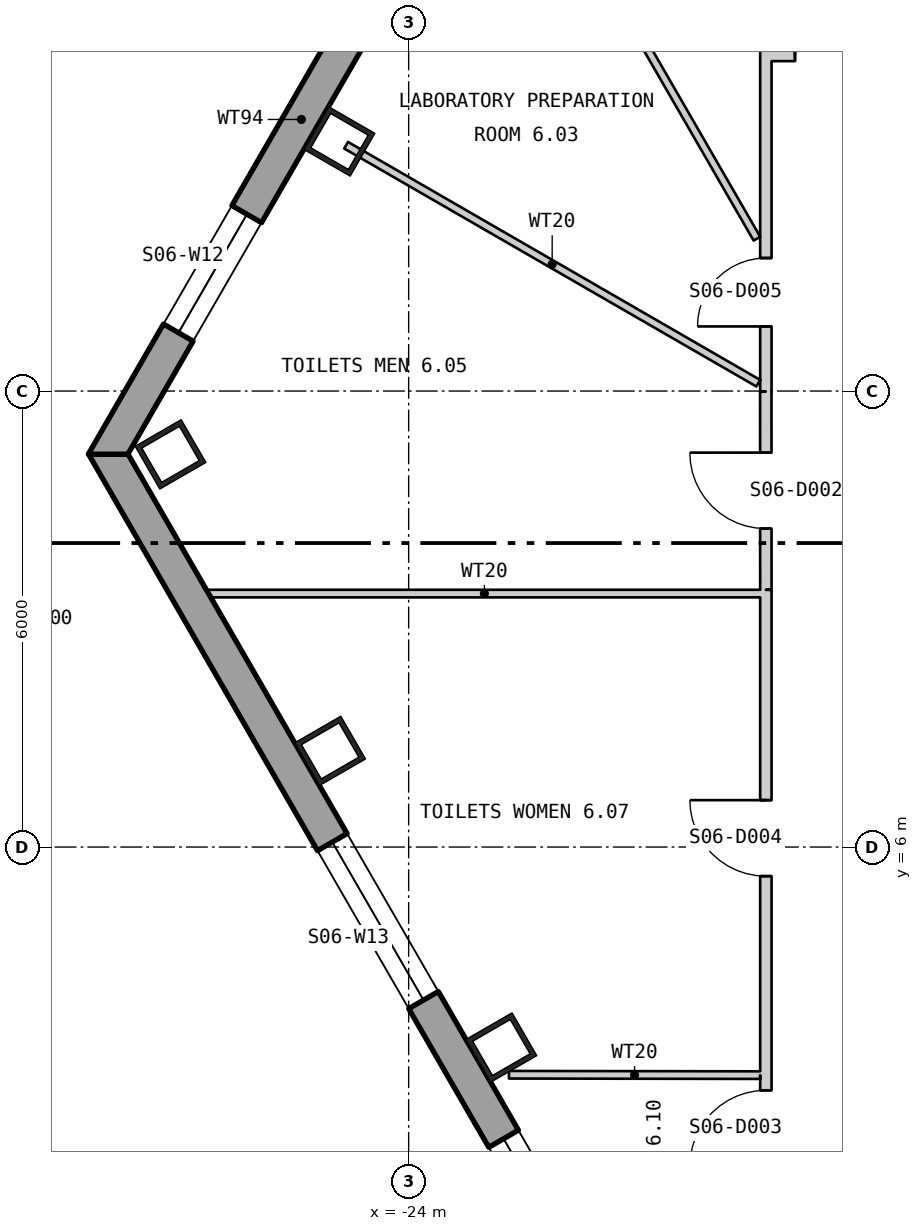
"""IFC4 building model, lengths in metres.
Left out: names, types, materials, properties, quantities, classifications, styles, units other than length and angle.
Written with IfcOpenShell. Run it as: python <this file> out.ifc"""

import sys

from ifc_helpers import new_model, si_unit, direction, frame, frame_2d, origin, origin_2d, place, context, subcontext, project, spatial, polyline, rectangle, hollow_rectangle, outline, extrude, element, fill, save


model = new_model("IFC4")
c1 = context("Model", 3, precision=1e-05, world=origin(), true_north=direction((0.0, 1.0)))
c2 = subcontext(c1, "Body", "Model", "MODEL_VIEW")
j1 = project(units=[si_unit("LENGTHUNIT", "METRE"), si_unit("PLANEANGLEUNIT", "RADIAN")], contexts=[c1])
p1 = place(None, origin())
s1 = spatial("IfcSite", under=j1, at=p1, CompositionType="ELEMENT")
p2 = place(p1, origin())
s2 = spatial("IfcBuilding", under=s1, at=p2, CompositionType="ELEMENT")
p3 = place(p2, frame((0.0, 0.0, 84.3)))
s3 = spatial("IfcBuildingStorey", under=s2, at=p3, CompositionType="ELEMENT", Elevation=84.3)
p4 = place(p3, frame((-24.91, 15.284, -0.8), z_axis=(0.0, 0.0, 1.0), x_axis=(-0.5, -0.866025403784, 0.0)))
e1 = element("IfcColumn", 1, at=p4, inside=s3, PredefinedType="COLUMN", context=c2, shape_type="SweptSolid", body=[
    extrude(hollow_rectangle(XDim=0.65, YDim=0.7, WallThickness=0.065, at=origin_2d()), origin(), (0.0, 0.0, 1.0), 5.3),
])
for number, where, z_axis, x_axis in (
    (2, (-27.133, 11.167, 0.0), (0.0, 0.0, 1.0), (0.5, -0.866, 0.0)),
    (3, (-25.033, 7.265, 0.0), (0.0, 0.0, 1.0), (0.5, -0.866, 0.0)),
    (4, (-22.78, 3.362, 0.0), (0.0, 0.0, 1.0), (0.5, -0.866, 0.0)),
):
    element("IfcColumn", number, at=place(p3, frame(where, z_axis=z_axis, x_axis=x_axis)), inside=s3, PredefinedType="COLUMN", context=c2, shape_type="SweptSolid", body=[
        extrude(hollow_rectangle(XDim=0.65, YDim=0.7, WallThickness=0.065, at=origin_2d()), origin(), (0.0, 0.0, 1.0), 4.5),
    ])
p5 = place(p3, frame((-22.869, 19.977, -0.4), z_axis=(0.0, 0.0, 1.0), x_axis=(-0.499997937663, -0.866026594472, 0.0)))
e5 = element("IfcWall", 5, at=p5, inside=s3, PredefinedType="SOLIDWALL", context=c2, shape_type="SweptSolid", body=[
    extrude(outline(polyline([(-0.13, -0.225), (10.3, -0.225), (10.04, 0.225), (0.13, 0.225), (-0.13, -0.225)])), origin(), (0.0, 0.0, 1.0), 4.5),
])
p6 = place(p5, frame((1.847, 0.0, 1.3)))
e6 = element("IfcOpeningElement", 6, at=p6, cuts=e5, PredefinedType="OPENING", context=c2, shape_type="SweptSolid", body=[
    extrude(rectangle(XDim=1.8, YDim=2.6, at=frame_2d((0.9, 1.3))), frame((0.0, 0.235, 0.0), z_axis=(0.0, -1.0, 0.0), x_axis=(1.0, 0.0, 0.0)), (0.0, 0.0, 1.0), 0.47),
])
p7 = place(p5, frame((6.523, 0.0, 1.3)))
e7 = element("IfcOpeningElement", 7, at=p7, cuts=e5, PredefinedType="OPENING", context=c2, shape_type="SweptSolid", body=[
    extrude(rectangle(XDim=1.8, YDim=2.6, at=frame_2d((0.9, 1.3))), frame((0.0, 0.235, 0.0), z_axis=(0.0, -1.0, 0.0), x_axis=(1.0, 0.0, 0.0)), (0.0, 0.0, 1.0), 0.47),
])
p8 = place(p3, frame((-27.95, 11.167, -0.18), z_axis=(0.0, 0.0, 1.0), x_axis=(0.499999194392, -0.866025868902, 0.0)))
e8 = element("IfcWall", 8, at=p8, inside=s3, PredefinedType="SOLIDWALL", context=c2, shape_type="SweptSolid", body=[
    extrude(outline(polyline([(-0.13, -0.225), (45.86, -0.225), (45.6, 0.225), (0.13, 0.225), (-0.13, -0.225)])), origin(), (0.0, 0.0, 1.0), 4.28),
])
p9 = place(p8, frame((5.892, 0.0, 1.08)))
e9 = element("IfcOpeningElement", 9, at=p9, cuts=e8, PredefinedType="OPENING", context=c2, shape_type="SweptSolid", body=[
    extrude(rectangle(XDim=2.4, YDim=2.6, at=frame_2d((1.2, 1.3))), frame((0.0, 0.235, 0.0), z_axis=(0.0, -1.0, 0.0), x_axis=(1.0, 0.0, 0.0)), (0.0, 0.0, 1.0), 0.47),
])
p10 = place(p8, frame((10.399, 0.0, 1.08)))
e10 = element("IfcOpeningElement", 10, at=p10, cuts=e8, PredefinedType="OPENING", context=c2, shape_type="SweptSolid", body=[
    extrude(rectangle(XDim=2.4, YDim=2.6, at=frame_2d((1.2, 1.3))), frame((0.0, 0.235, 0.0), z_axis=(0.0, -1.0, 0.0), x_axis=(1.0, 0.0, 0.0)), (0.0, 0.0, 1.0), 0.47),
])
p11 = place(p8, frame((14.905, 0.0, 1.08)))
e11 = element("IfcOpeningElement", 11, at=p11, cuts=e8, PredefinedType="OPENING", context=c2, shape_type="SweptSolid", body=[
    extrude(rectangle(XDim=2.4, YDim=2.6, at=frame_2d((1.2, 1.3))), frame((0.0, 0.235, 0.0), z_axis=(0.0, -1.0, 0.0), x_axis=(1.0, 0.0, 0.0)), (0.0, 0.0, 1.0), 0.47),
])
p12 = place(p8, frame((19.412, 0.0, 1.08)))
e12 = element("IfcOpeningElement", 12, at=p12, cuts=e8, PredefinedType="OPENING", context=c2, shape_type="SweptSolid", body=[
    extrude(rectangle(XDim=2.4, YDim=2.6, at=frame_2d((1.2, 1.3))), frame((0.0, 0.235, 0.0), z_axis=(0.0, -1.0, 0.0), x_axis=(1.0, 0.0, 0.0)), (0.0, 0.0, 1.0), 0.47),
])
p13 = place(p8, frame((23.918, 0.0, 1.08)))
e13 = element("IfcOpeningElement", 13, at=p13, cuts=e8, PredefinedType="OPENING", context=c2, shape_type="SweptSolid", body=[
    extrude(rectangle(XDim=2.4, YDim=2.6, at=frame_2d((1.2, 1.3))), frame((0.0, 0.235, 0.0), z_axis=(0.0, -1.0, 0.0), x_axis=(1.0, 0.0, 0.0)), (0.0, 0.0, 1.0), 0.47),
])
p14 = place(p8, frame((28.425, 0.0, 1.08)))
e14 = element("IfcOpeningElement", 14, at=p14, cuts=e8, PredefinedType="OPENING", context=c2, shape_type="SweptSolid", body=[
    extrude(rectangle(XDim=2.4, YDim=2.6, at=frame_2d((1.2, 1.3))), frame((0.0, 0.235, 0.0), z_axis=(0.0, -1.0, 0.0), x_axis=(1.0, 0.0, 0.0)), (0.0, 0.0, 1.0), 0.47),
])
p15 = place(p8, frame((32.932, 0.0, 1.08)))
e15 = element("IfcOpeningElement", 15, at=p15, cuts=e8, PredefinedType="OPENING", context=c2, shape_type="SweptSolid", body=[
    extrude(rectangle(XDim=2.4, YDim=2.6, at=frame_2d((1.2, 1.3))), frame((0.0, 0.235, 0.0), z_axis=(0.0, -1.0, 0.0), x_axis=(1.0, 0.0, 0.0)), (0.0, 0.0, 1.0), 0.47),
])
p16 = place(p8, frame((37.438, 0.0, 1.08)))
e16 = element("IfcOpeningElement", 16, at=p16, cuts=e8, PredefinedType="OPENING", context=c2, shape_type="SweptSolid", body=[
    extrude(rectangle(XDim=2.4, YDim=2.6, at=frame_2d((1.2, 1.3))), frame((0.0, 0.235, 0.0), z_axis=(0.0, -1.0, 0.0), x_axis=(1.0, 0.0, 0.0)), (0.0, 0.0, 1.0), 0.47),
])
p17 = place(p8, frame((41.907, 0.0, 1.08)))
e17 = element("IfcOpeningElement", 17, at=p17, cuts=e8, PredefinedType="OPENING", context=c2, shape_type="SweptSolid", body=[
    extrude(rectangle(XDim=2.4, YDim=2.6, at=frame_2d((1.2, 1.3))), frame((0.0, 0.235, 0.0), z_axis=(0.0, -1.0, 0.0), x_axis=(1.0, 0.0, 0.0)), (0.0, 0.0, 1.0), 0.47),
])
p18 = place(p3, frame((-26.632, 9.335, 0.0), z_axis=(0.0, 0.0, 1.0), x_axis=(1.0, 0.0, 0.0)))
e18 = element("IfcWall", 18, at=p18, inside=s3, PredefinedType="PARTITIONING", context=c2, shape_type="SweptSolid", body=[
    extrude(rectangle(XDim=7.257, YDim=0.1, at=frame_2d((3.628, 0.0))), origin(), (0.0, 0.0, 1.0), 4.3),
])
p19 = place(p3, frame((-24.823, 15.234, 0.0), z_axis=(0.0, 0.0, 1.0), x_axis=(0.866023364538, -0.500003532061, 0.0)))
e19 = element("IfcWall", 19, at=p19, inside=s3, PredefinedType="PARTITIONING", context=c2, shape_type="SweptSolid", body=[
    extrude(rectangle(XDim=6.262, YDim=0.1, at=frame_2d((3.131, 0.0))), origin(), (0.0, 0.0, 1.0), 4.3),
])
p20 = place(p3, frame((-22.68, 3.004, 0.0), z_axis=(0.0, 0.0, 1.0), x_axis=(0.99999885563, -0.001512857573, 0.0)))
e20 = element("IfcWall", 20, at=p20, inside=s3, PredefinedType="PARTITIONING", context=c2, shape_type="SweptSolid", body=[
    extrude(rectangle(XDim=3.305, YDim=0.1, at=frame_2d((1.653, 0.0))), origin(), (0.0, 0.0, 1.0), 3.8),
])
p21 = place(p3, frame((-22.406, 19.18, 0.0), z_axis=(0.0, 0.0, 1.0), x_axis=(0.500026652407, -0.866010015463, 0.0)))
e21 = element("IfcWall", 21, at=p21, inside=s3, PredefinedType="PARTITIONING", context=c2, shape_type="SweptSolid", body=[
    extrude(rectangle(XDim=5.976, YDim=0.1, at=frame_2d((2.988, 0.0))), origin(), (0.0, 0.0, 1.0), 4.3),
])
p22 = place(p3, frame((-19.301, 11.995, 0.0), z_axis=(0.0, 0.0, 1.0), x_axis=(0.000383141734, -0.999999926601, 0.0)))
e22 = element("IfcWall", 22, at=p22, inside=s3, PredefinedType="PARTITIONING", context=c2, shape_type="SweptSolid", body=[
    extrude(rectangle(XDim=2.61, YDim=0.15, at=frame_2d((1.305, 0.0))), origin(), (0.0, 0.0, 1.0), 4.3),
])
p23 = place(p22, frame((0.805, 0.0, 0.0)))
e23 = element("IfcOpeningElement", 23, at=p23, cuts=e22, PredefinedType="OPENING", context=c2, shape_type="SweptSolid", body=[
    extrude(rectangle(XDim=1.0, YDim=2.1, at=frame_2d((0.5, 1.05))), frame((0.0, 0.085, 0.0), z_axis=(0.0, -1.0, 0.0), x_axis=(1.0, 0.0, 0.0)), (0.0, 0.0, 1.0), 0.17),
])
p24 = place(p3, frame((-19.3, -1.725, 0.0), z_axis=(0.0, 0.0, 1.0), x_axis=(0.0, 1.0, 0.0)))
e24 = element("IfcWall", 24, at=p24, inside=s3, PredefinedType="PARTITIONING", context=c2, shape_type="SweptSolid", body=[
    extrude(rectangle(XDim=11.11, YDim=0.15, at=frame_2d((5.555, 0.0))), origin(), (0.0, 0.0, 1.0), 4.3),
])
p25 = place(p24, frame((3.524, 0.0, 0.0)))
e25 = element("IfcOpeningElement", 25, at=p25, cuts=e24, PredefinedType="OPENING", context=c2, shape_type="SweptSolid", body=[
    extrude(rectangle(XDim=1.0, YDim=2.1, at=frame_2d((0.5, 1.05))), frame((0.0, 0.085, 0.0), z_axis=(0.0, -1.0, 0.0), x_axis=(1.0, 0.0, 0.0)), (0.0, 0.0, 1.0), 0.17),
])
p26 = place(p24, frame((7.342, 0.0, 0.0)))
e26 = element("IfcOpeningElement", 26, at=p26, cuts=e24, PredefinedType="OPENING", context=c2, shape_type="SweptSolid", body=[
    extrude(rectangle(XDim=1.0, YDim=2.1, at=frame_2d((0.5, 1.05))), frame((0.0, 0.085, 0.0), z_axis=(0.0, -1.0, 0.0), x_axis=(1.0, 0.0, 0.0)), (0.0, 0.0, 1.0), 0.17),
])
p27 = place(p3, frame((-19.3, 11.995, 0.0), z_axis=(0.0, 0.0, 1.0), x_axis=(0.0, 1.0, 0.0)))
e27 = element("IfcWall", 27, at=p27, inside=s3, PredefinedType="PARTITIONING", context=c2, shape_type="SweptSolid", body=[
    extrude(rectangle(XDim=4.496, YDim=0.15, at=frame_2d((2.248, 0.0))), origin(), (0.0, 0.0, 1.0), 4.3),
])
p28 = place(p27, frame((0.855, 0.0, 0.0)))
e28 = element("IfcOpeningElement", 28, at=p28, cuts=e27, PredefinedType="OPENING", context=c2, shape_type="SweptSolid", body=[
    extrude(rectangle(XDim=0.9, YDim=2.1, at=frame_2d((0.45, 1.05))), frame((0.0, 0.085, 0.0), z_axis=(0.0, -1.0, 0.0), x_axis=(1.0, 0.0, 0.0)), (0.0, 0.0, 1.0), 0.17),
])
p29 = place(p3, frame((-19.225, 16.416, 0.0), z_axis=(0.0, 0.0, 1.0), x_axis=(1.0, 0.0, 0.0)))
e29 = element("IfcWall", 29, at=p29, inside=s3, PredefinedType="PARTITIONING", context=c2, shape_type="SweptSolid", body=[
    extrude(rectangle(XDim=1.725, YDim=0.15, at=frame_2d((0.863, 0.0))), origin(), (0.0, 0.0, 1.0), 4.3),
])
p30 = place(p29, frame((0.308, 0.0, 0.0)))
e30 = element("IfcOpeningElement", 30, at=p30, cuts=e29, PredefinedType="OPENING", context=c2, shape_type="SweptSolid", body=[
    extrude(rectangle(XDim=1.0, YDim=2.1, at=frame_2d((0.5, 1.05))), frame((0.0, 0.085, 0.0), z_axis=(0.0, -1.0, 0.0), x_axis=(1.0, 0.0, 0.0)), (0.0, 0.0, 1.0), 0.17),
])
p31 = place(p7, origin())
e31 = element("IfcWindow", 31, at=p31, inside=s3, PartitioningType="SINGLE_PANEL", PredefinedType="WINDOW", context=c2, shape_type="SweptSolid", body=[
    extrude(rectangle(XDim=1.8, YDim=2.6, at=frame_2d((0.9, 1.3))), frame((0.0, 0.105, 0.0), z_axis=(0.0, -1.0, 0.0), x_axis=(1.0, 0.0, 0.0)), (0.0, 0.0, 1.0), 0.06),
])
fill(e7, e31)
p32 = place(p9, origin())
e32 = element("IfcWindow", 32, at=p32, inside=s3, PartitioningType="SINGLE_PANEL", PredefinedType="WINDOW", context=c2, shape_type="SweptSolid", body=[
    extrude(rectangle(XDim=2.4, YDim=2.6, at=frame_2d((1.2, 1.3))), frame((0.0, 0.105, 0.0), z_axis=(0.0, -1.0, 0.0), x_axis=(1.0, 0.0, 0.0)), (0.0, 0.0, 1.0), 0.06),
])
fill(e9, e32)
p33 = place(p10, origin())
e33 = element("IfcWindow", 33, at=p33, inside=s3, PartitioningType="SINGLE_PANEL", PredefinedType="WINDOW", context=c2, shape_type="SweptSolid", body=[
    extrude(rectangle(XDim=2.4, YDim=2.6, at=frame_2d((1.2, 1.3))), frame((0.0, 0.105, 0.0), z_axis=(0.0, -1.0, 0.0), x_axis=(1.0, 0.0, 0.0)), (0.0, 0.0, 1.0), 0.06),
])
fill(e10, e33)
p34 = place(p23, origin())
e34 = element("IfcDoor", 34, at=p34, inside=s3, OperationType="SINGLE_SWING_LEFT", PredefinedType="DOOR", context=c2, shape_type="SweptSolid", body=[
    extrude(rectangle(XDim=1.0, YDim=2.1, at=frame_2d((0.5, 1.05))), frame((0.0, 0.025, 0.0), z_axis=(0.0, -1.0, 0.0), x_axis=(1.0, 0.0, 0.0)), (0.0, 0.0, 1.0), 0.05),
])
fill(e23, e34)
p35 = place(p25, origin())
e35 = element("IfcDoor", 35, at=p35, inside=s3, OperationType="SINGLE_SWING_RIGHT", PredefinedType="DOOR", context=c2, shape_type="SweptSolid", body=[
    extrude(rectangle(XDim=1.0, YDim=2.1, at=frame_2d((0.5, 1.05))), frame((0.0, 0.025, 0.0), z_axis=(0.0, -1.0, 0.0), x_axis=(1.0, 0.0, 0.0)), (0.0, 0.0, 1.0), 0.05),
])
fill(e25, e35)
p36 = place(p26, origin())
e36 = element("IfcDoor", 36, at=p36, inside=s3, OperationType="SINGLE_SWING_LEFT", PredefinedType="DOOR", context=c2, shape_type="SweptSolid", body=[
    extrude(rectangle(XDim=1.0, YDim=2.1, at=frame_2d((0.5, 1.05))), frame((0.0, 0.025, 0.0), z_axis=(0.0, -1.0, 0.0), x_axis=(1.0, 0.0, 0.0)), (0.0, 0.0, 1.0), 0.05),
])
fill(e26, e36)
p37 = place(p28, origin())
e37 = element("IfcDoor", 37, at=p37, inside=s3, OperationType="SINGLE_SWING_RIGHT", PredefinedType="DOOR", context=c2, shape_type="SweptSolid", body=[
    extrude(rectangle(XDim=0.9, YDim=2.1, at=frame_2d((0.45, 1.05))), frame((0.0, 0.025, 0.0), z_axis=(0.0, -1.0, 0.0), x_axis=(1.0, 0.0, 0.0)), (0.0, 0.0, 1.0), 0.05),
])
fill(e28, e37)
p38 = place(p30, origin())
e38 = element("IfcDoor", 38, at=p38, inside=s3, OperationType="SINGLE_SWING_RIGHT", PredefinedType="DOOR", context=c2, shape_type="SweptSolid", body=[
    extrude(rectangle(XDim=1.0, YDim=2.1, at=frame_2d((0.5, 1.05))), frame((0.0, 0.025, 0.0), z_axis=(0.0, -1.0, 0.0), x_axis=(1.0, 0.0, 0.0)), (0.0, 0.0, 1.0), 0.05),
])
fill(e30, e38)
save(model, sys.argv[1])
